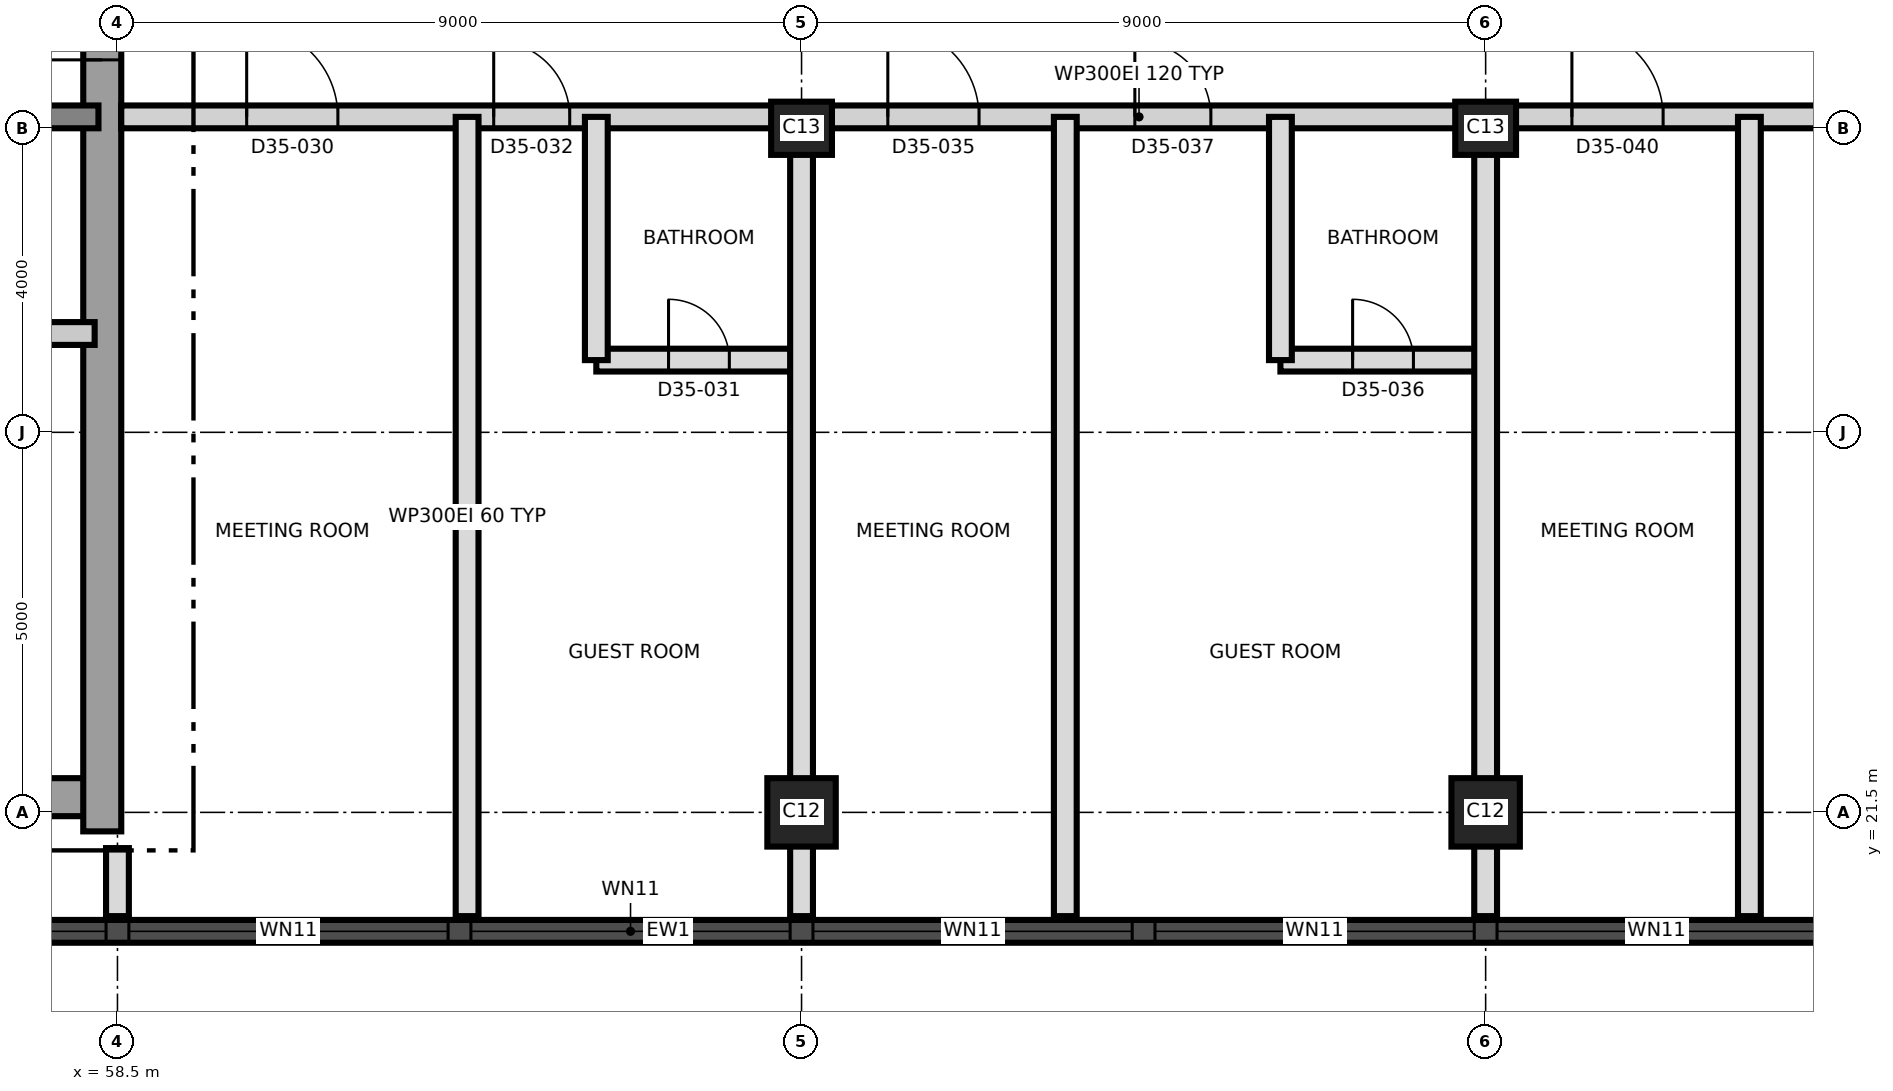
"""IFC4 building model, lengths in metres.
Left out: names, types, materials, properties, quantities, classifications, styles, units other than length and angle.
Written with IfcOpenShell. Run it as: python <this file> out.ifc"""

import sys

from ifc_helpers import new_model, si_unit, direction, frame, frame_2d, origin, origin_2d, place, context, subcontext, project, spatial, rectangle, extrude, element, fill, save


model = new_model("IFC4")
c1 = context("Model", 3, precision=1e-05, world=origin(), true_north=direction((0.0, 1.0)))
c2 = subcontext(c1, "Body", "Model", "MODEL_VIEW")
j1 = project(units=[si_unit("LENGTHUNIT", "METRE"), si_unit("PLANEANGLEUNIT", "RADIAN")], contexts=[c1])
p1 = place(None, origin())
s1 = spatial("IfcSite", under=j1, at=p1, CompositionType="ELEMENT")
p2 = place(p1, origin())
s2 = spatial("IfcBuilding", under=s1, at=p2, CompositionType="ELEMENT")
p3 = place(p2, frame((0.0, 0.0, 195.8)))
s3 = spatial("IfcBuildingStorey", under=s2, at=p3, CompositionType="ELEMENT", Elevation=195.8)
p4 = place(p3, frame((31.25, 21.7, 0.0), z_axis=(0.0, 0.0, 1.0), x_axis=(1.0, 0.0, 0.0)))
e1 = element("IfcWall", 1, at=p4, inside=s3, PredefinedType="SHEAR", context=c2, shape_type="SweptSolid", body=[
    extrude(rectangle(XDim=27.0, YDim=0.5, at=frame_2d((13.5, 0.0))), origin(), (0.0, 0.0, 1.0), 3.7),
])
p5 = place(p3, frame((58.3, 21.25, 0.0), z_axis=(0.0, 0.0, 1.0), x_axis=(0.0, 1.0, 0.0)))
e2 = element("IfcWall", 2, at=p5, inside=s3, PredefinedType="SHEAR", context=c2, shape_type="SweptSolid", body=[
    extrude(rectangle(XDim=18.5, YDim=0.5, at=frame_2d((9.25, 0.0))), origin(), (0.0, 0.0, 1.0), 3.7),
])
p6 = place(p5, frame((10.15, 0.0, 0.0)))
e3 = element("IfcOpeningElement", 3, at=p6, cuts=e2, PredefinedType="OPENING", context=c2, shape_type="SweptSolid", body=[
    extrude(rectangle(XDim=1.2, YDim=2.1, at=frame_2d((0.6, 1.05))), frame((0.0, 0.26, 0.0), z_axis=(0.0, -1.0, 0.0), x_axis=(1.0, 0.0, 0.0)), (0.0, 0.0, 1.0), 0.52),
])
p7 = place(p3, frame((31.75, 30.65, 0.0), z_axis=(0.0, 0.0, 1.0), x_axis=(1.0, 0.0, 0.0)))
e4 = element("IfcWall", 4, at=p7, inside=s3, PredefinedType="SHEAR", context=c2, shape_type="SweptSolid", body=[
    extrude(rectangle(XDim=26.5, YDim=0.3, at=frame_2d((13.25, 0.0))), origin(), (0.0, 0.0, 1.0), 3.7),
])
p8 = place(p7, frame((24.75, 0.0, 0.0)))
e5 = element("IfcOpeningElement", 5, at=p8, cuts=e4, PredefinedType="OPENING", context=c2, shape_type="SweptSolid", body=[
    extrude(rectangle(XDim=1.0, YDim=2.1, at=frame_2d((0.5, 1.05))), frame((0.0, 0.16, 0.0), z_axis=(0.0, -1.0, 0.0), x_axis=(1.0, 0.0, 0.0)), (0.0, 0.0, 1.0), 0.32),
])
p9 = place(p7, frame((4.05, 0.0, 0.0)))
e6 = element("IfcOpeningElement", 6, at=p9, cuts=e4, PredefinedType="OPENING", context=c2, shape_type="SweptSolid", body=[
    extrude(rectangle(XDim=1.0, YDim=2.1, at=frame_2d((0.5, 1.05))), frame((0.0, 0.16, 0.0), z_axis=(0.0, -1.0, 0.0), x_axis=(1.0, 0.0, 0.0)), (0.0, 0.0, 1.0), 0.32),
])
for number, where, z_axis, x_axis in (
    (7, (67.5, 21.5, 0.0), (0.0, 0.0, 1.0), (1.0, 0.0, 0.0)),
    (8, (76.5, 21.5, 0.0), (0.0, 0.0, 1.0), (1.0, 0.0, 0.0)),
):
    element("IfcColumn", number, at=place(p3, frame(where, z_axis=z_axis, x_axis=x_axis)), inside=s3, PredefinedType="COLUMN", context=c2, shape_type="SweptSolid", body=[
        extrude(rectangle(XDim=0.9, YDim=0.9, at=origin_2d()), origin(), (0.0, 0.0, 1.0), 3.7),
    ])
for number, where, z_axis, x_axis in (
    (9, (67.5, 30.5, 0.0), (0.0, 0.0, 1.0), (1.0, 0.0, 0.0)),
    (10, (76.5, 30.5, 0.0), (0.0, 0.0, 1.0), (1.0, 0.0, 0.0)),
):
    element("IfcColumn", number, at=place(p3, frame(where, z_axis=z_axis, x_axis=x_axis)), inside=s3, PredefinedType="COLUMN", context=c2, shape_type="SweptSolid", body=[
        extrude(rectangle(XDim=0.8, YDim=0.7, at=origin_2d()), origin(), (0.0, 0.0, 1.0), 3.7),
    ])
p10 = place(p3, frame((44.01, 19.935, 0.0), z_axis=(0.0, 0.0, 1.0), x_axis=(1.0, 0.0, 0.0)))
e11 = element("IfcWall", 11, at=p10, inside=s3, PredefinedType="SOLIDWALL", context=c2, shape_type="SweptSolid", body=[
    extrude(rectangle(XDim=43.477, YDim=0.3, at=frame_2d((21.738, 0.0))), origin(), (0.0, 0.0, 1.0), 3.4),
])
p11 = place(p10, frame((1.845, 0.0, 0.3)))
e12 = element("IfcOpeningElement", 12, at=p11, cuts=e11, PredefinedType="OPENING", context=c2, shape_type="SweptSolid", body=[
    extrude(rectangle(XDim=1.8, YDim=2.4, at=frame_2d((0.9, 1.2))), frame((0.0, 0.16, 0.0), z_axis=(0.0, -1.0, 0.0), x_axis=(1.0, 0.0, 0.0)), (0.0, 0.0, 1.0), 0.32),
])
p12 = place(p10, frame((5.64, 0.0, 0.9)))
e13 = element("IfcOpeningElement", 13, at=p12, cuts=e11, PredefinedType="OPENING", context=c2, shape_type="SweptSolid", body=[
    extrude(rectangle(XDim=4.2, YDim=1.5, at=frame_2d((2.1, 0.75))), frame((0.0, 0.16, 0.0), z_axis=(0.0, -1.0, 0.0), x_axis=(1.0, 0.0, 0.0)), (0.0, 0.0, 1.0), 0.32),
])
p13 = place(p10, frame((10.14, 0.0, 0.9)))
e14 = element("IfcOpeningElement", 14, at=p13, cuts=e11, PredefinedType="OPENING", context=c2, shape_type="SweptSolid", body=[
    extrude(rectangle(XDim=4.2, YDim=1.5, at=frame_2d((2.1, 0.75))), frame((0.0, 0.16, 0.0), z_axis=(0.0, -1.0, 0.0), x_axis=(1.0, 0.0, 0.0)), (0.0, 0.0, 1.0), 0.32),
])
p14 = place(p10, frame((14.64, 0.0, 0.9)))
e15 = element("IfcOpeningElement", 15, at=p14, cuts=e11, PredefinedType="OPENING", context=c2, shape_type="SweptSolid", body=[
    extrude(rectangle(XDim=4.2, YDim=1.5, at=frame_2d((2.1, 0.75))), frame((0.0, 0.16, 0.0), z_axis=(0.0, -1.0, 0.0), x_axis=(1.0, 0.0, 0.0)), (0.0, 0.0, 1.0), 0.32),
])
p15 = place(p10, frame((19.14, 0.0, 0.9)))
e16 = element("IfcOpeningElement", 16, at=p15, cuts=e11, PredefinedType="OPENING", context=c2, shape_type="SweptSolid", body=[
    extrude(rectangle(XDim=4.2, YDim=1.5, at=frame_2d((2.1, 0.75))), frame((0.0, 0.16, 0.0), z_axis=(0.0, -1.0, 0.0), x_axis=(1.0, 0.0, 0.0)), (0.0, 0.0, 1.0), 0.32),
])
p16 = place(p10, frame((23.64, 0.0, 0.9)))
e17 = element("IfcOpeningElement", 17, at=p16, cuts=e11, PredefinedType="OPENING", context=c2, shape_type="SweptSolid", body=[
    extrude(rectangle(XDim=4.2, YDim=1.5, at=frame_2d((2.1, 0.75))), frame((0.0, 0.16, 0.0), z_axis=(0.0, -1.0, 0.0), x_axis=(1.0, 0.0, 0.0)), (0.0, 0.0, 1.0), 0.32),
])
p17 = place(p10, frame((28.14, 0.0, 0.9)))
e18 = element("IfcOpeningElement", 18, at=p17, cuts=e11, PredefinedType="OPENING", context=c2, shape_type="SweptSolid", body=[
    extrude(rectangle(XDim=4.2, YDim=1.5, at=frame_2d((2.1, 0.75))), frame((0.0, 0.16, 0.0), z_axis=(0.0, -1.0, 0.0), x_axis=(1.0, 0.0, 0.0)), (0.0, 0.0, 1.0), 0.32),
])
p18 = place(p10, frame((32.64, 0.0, 0.9)))
e19 = element("IfcOpeningElement", 19, at=p18, cuts=e11, PredefinedType="OPENING", context=c2, shape_type="SweptSolid", body=[
    extrude(rectangle(XDim=4.2, YDim=1.5, at=frame_2d((2.1, 0.75))), frame((0.0, 0.16, 0.0), z_axis=(0.0, -1.0, 0.0), x_axis=(1.0, 0.0, 0.0)), (0.0, 0.0, 1.0), 0.32),
])
p19 = place(p10, frame((37.14, 0.0, 0.9)))
e20 = element("IfcOpeningElement", 20, at=p19, cuts=e11, PredefinedType="OPENING", context=c2, shape_type="SweptSolid", body=[
    extrude(rectangle(XDim=4.2, YDim=1.5, at=frame_2d((2.1, 0.75))), frame((0.0, 0.16, 0.0), z_axis=(0.0, -1.0, 0.0), x_axis=(1.0, 0.0, 0.0)), (0.0, 0.0, 1.0), 0.32),
])
p20 = place(p3, frame((55.8, 27.8, 0.0), z_axis=(0.0, 0.0, 1.0), x_axis=(1.0, 0.0, 0.0)))
e21 = element("IfcWall", 21, at=p20, inside=s3, PredefinedType="PARTITIONING", context=c2, shape_type="SweptSolid", body=[
    extrude(rectangle(XDim=2.4, YDim=0.3, at=frame_2d((1.2, 0.0))), origin(), (0.0, 0.0, 1.0), 3.4),
])
p21 = place(p20, frame((0.75, 0.0, 0.0)))
e22 = element("IfcOpeningElement", 22, at=p21, cuts=e21, PredefinedType="OPENING", context=c2, shape_type="SweptSolid", body=[
    extrude(rectangle(XDim=0.9, YDim=2.1, at=frame_2d((0.45, 1.05))), frame((0.0, 0.16, 0.0), z_axis=(0.0, -1.0, 0.0), x_axis=(1.0, 0.0, 0.0)), (0.0, 0.0, 1.0), 0.32),
])
p22 = place(p3, frame((64.8, 27.45, 0.0), z_axis=(0.0, 0.0, 1.0), x_axis=(1.0, 0.0, 0.0)))
e23 = element("IfcWall", 23, at=p22, inside=s3, PredefinedType="PARTITIONING", context=c2, shape_type="SweptSolid", body=[
    extrude(rectangle(XDim=2.7, YDim=0.3, at=frame_2d((1.35, 0.0))), origin(), (0.0, 0.0, 1.0), 3.4),
])
p23 = place(p22, frame((0.95, 0.0, 0.0)))
e24 = element("IfcOpeningElement", 24, at=p23, cuts=e23, PredefinedType="OPENING", context=c2, shape_type="SweptSolid", body=[
    extrude(rectangle(XDim=0.8, YDim=2.1, at=frame_2d((0.4, 1.05))), frame((0.0, 0.16, 0.0), z_axis=(0.0, -1.0, 0.0), x_axis=(1.0, 0.0, 0.0)), (0.0, 0.0, 1.0), 0.32),
])
p24 = place(p3, frame((73.8, 27.45, 0.0), z_axis=(0.0, 0.0, 1.0), x_axis=(1.0, 0.0, 0.0)))
e25 = element("IfcWall", 25, at=p24, inside=s3, PredefinedType="PARTITIONING", context=c2, shape_type="SweptSolid", body=[
    extrude(rectangle(XDim=2.7, YDim=0.3, at=frame_2d((1.35, 0.0))), origin(), (0.0, 0.0, 1.0), 3.4),
])
p25 = place(p24, frame((0.95, 0.0, 0.0)))
e26 = element("IfcOpeningElement", 26, at=p25, cuts=e25, PredefinedType="OPENING", context=c2, shape_type="SweptSolid", body=[
    extrude(rectangle(XDim=0.8, YDim=2.1, at=frame_2d((0.4, 1.05))), frame((0.0, 0.16, 0.0), z_axis=(0.0, -1.0, 0.0), x_axis=(1.0, 0.0, 0.0)), (0.0, 0.0, 1.0), 0.32),
])
p26 = place(p3, frame((58.55, 30.65, 0.0), z_axis=(0.0, 0.0, 1.0), x_axis=(1.0, 0.0, 0.0)))
e27 = element("IfcWall", 27, at=p26, inside=s3, PredefinedType="PARTITIONING", context=c2, shape_type="SweptSolid", body=[
    extrude(rectangle(XDim=26.78, YDim=0.3, at=frame_2d((13.39, 0.0))), origin(), (0.0, 0.0, 1.0), 3.4),
])
p27 = place(p26, frame((1.65, 0.0, 0.0)))
e28 = element("IfcOpeningElement", 28, at=p27, cuts=e27, PredefinedType="OPENING", context=c2, shape_type="SweptSolid", body=[
    extrude(rectangle(XDim=1.2, YDim=2.1, at=frame_2d((0.6, 1.05))), frame((0.0, 0.16, 0.0), z_axis=(0.0, -1.0, 0.0), x_axis=(1.0, 0.0, 0.0)), (0.0, 0.0, 1.0), 0.32),
])
p28 = place(p26, frame((4.9, 0.0, 0.0)))
e29 = element("IfcOpeningElement", 29, at=p28, cuts=e27, PredefinedType="OPENING", context=c2, shape_type="SweptSolid", body=[
    extrude(rectangle(XDim=1.0, YDim=2.1, at=frame_2d((0.5, 1.05))), frame((0.0, 0.16, 0.0), z_axis=(0.0, -1.0, 0.0), x_axis=(1.0, 0.0, 0.0)), (0.0, 0.0, 1.0), 0.32),
])
p29 = place(p26, frame((10.085, 0.0, 0.0)))
e30 = element("IfcOpeningElement", 30, at=p29, cuts=e27, PredefinedType="OPENING", context=c2, shape_type="SweptSolid", body=[
    extrude(rectangle(XDim=1.2, YDim=2.1, at=frame_2d((0.6, 1.05))), frame((0.0, 0.16, 0.0), z_axis=(0.0, -1.0, 0.0), x_axis=(1.0, 0.0, 0.0)), (0.0, 0.0, 1.0), 0.32),
])
p30 = place(p26, frame((13.335, 0.0, 0.0)))
e31 = element("IfcOpeningElement", 31, at=p30, cuts=e27, PredefinedType="OPENING", context=c2, shape_type="SweptSolid", body=[
    extrude(rectangle(XDim=1.0, YDim=2.1, at=frame_2d((0.5, 1.05))), frame((0.0, 0.16, 0.0), z_axis=(0.0, -1.0, 0.0), x_axis=(1.0, 0.0, 0.0)), (0.0, 0.0, 1.0), 0.32),
])
p31 = place(p26, frame((19.085, 0.0, 0.0)))
e32 = element("IfcOpeningElement", 32, at=p31, cuts=e27, PredefinedType="OPENING", context=c2, shape_type="SweptSolid", body=[
    extrude(rectangle(XDim=1.2, YDim=2.1, at=frame_2d((0.6, 1.05))), frame((0.0, 0.16, 0.0), z_axis=(0.0, -1.0, 0.0), x_axis=(1.0, 0.0, 0.0)), (0.0, 0.0, 1.0), 0.32),
])
p32 = place(p26, frame((22.335, 0.0, 0.0)))
e33 = element("IfcOpeningElement", 33, at=p32, cuts=e27, PredefinedType="OPENING", context=c2, shape_type="SweptSolid", body=[
    extrude(rectangle(XDim=1.0, YDim=2.1, at=frame_2d((0.5, 1.05))), frame((0.0, 0.16, 0.0), z_axis=(0.0, -1.0, 0.0), x_axis=(1.0, 0.0, 0.0)), (0.0, 0.0, 1.0), 0.32),
])
p33 = place(p3, frame((58.5, 20.135, 0.0), z_axis=(0.0, 0.0, 1.0), x_axis=(0.0, 1.0, 0.0)))
e34 = element("IfcWall", 34, at=p33, inside=s3, PredefinedType="PARTITIONING", context=c2, shape_type="SweptSolid", body=[
    extrude(rectangle(XDim=0.895, YDim=0.3, at=frame_2d((0.448, 0.0))), origin(), (0.0, 0.0, 1.0), 3.4),
])
p34 = place(p3, frame((63.1, 20.135, 0.0), z_axis=(0.0, 0.0, 1.0), x_axis=(0.0, 1.0, 0.0)))
e35 = element("IfcWall", 35, at=p34, inside=s3, PredefinedType="PARTITIONING", context=c2, shape_type="SweptSolid", body=[
    extrude(rectangle(XDim=10.515, YDim=0.3, at=frame_2d((5.257, 0.0))), origin(), (0.0, 0.0, 1.0), 3.4),
])
p35 = place(p3, frame((64.8, 27.45, 0.0), z_axis=(0.0, 0.0, 1.0), x_axis=(0.0, 1.0, 0.0)))
e36 = element("IfcWall", 36, at=p35, inside=s3, PredefinedType="PARTITIONING", context=c2, shape_type="SweptSolid", body=[
    extrude(rectangle(XDim=3.2, YDim=0.3, at=frame_2d((1.6, 0.0))), origin(), (0.0, 0.0, 1.0), 3.4),
])
for number, where, z_axis, x_axis in (
    (37, (67.5, 20.135, 0.0), (0.0, 0.0, 1.0), (0.0, 1.0, 0.0)),
    (38, (70.97, 20.135, 0.0), (0.0, 0.0, 1.0), (0.0, 1.0, 0.0)),
):
    element("IfcWall", number, at=place(p3, frame(where, z_axis=z_axis, x_axis=x_axis)), inside=s3, PredefinedType="PARTITIONING", context=c2, shape_type="SweptSolid", body=[
        extrude(rectangle(XDim=10.515, YDim=0.3, at=frame_2d((5.257, 0.0))), origin(), (0.0, 0.0, 1.0), 3.4),
    ])
p36 = place(p3, frame((73.8, 27.45, 0.0), z_axis=(0.0, 0.0, 1.0), x_axis=(0.0, 1.0, 0.0)))
e39 = element("IfcWall", 39, at=p36, inside=s3, PredefinedType="PARTITIONING", context=c2, shape_type="SweptSolid", body=[
    extrude(rectangle(XDim=3.2, YDim=0.3, at=frame_2d((1.6, 0.0))), origin(), (0.0, 0.0, 1.0), 3.4),
])
for number, where, z_axis, x_axis in (
    (40, (76.5, 20.135, 0.0), (0.0, 0.0, 1.0), (0.0, 1.0, 0.0)),
    (41, (79.97, 20.135, 0.0), (0.0, 0.0, 1.0), (0.0, 1.0, 0.0)),
):
    element("IfcWall", number, at=place(p3, frame(where, z_axis=z_axis, x_axis=x_axis)), inside=s3, PredefinedType="PARTITIONING", context=c2, shape_type="SweptSolid", body=[
        extrude(rectangle(XDim=10.515, YDim=0.3, at=frame_2d((5.257, 0.0))), origin(), (0.0, 0.0, 1.0), 3.4),
    ])
p37 = place(p13, origin())
e42 = element("IfcWindow", 42, at=p37, inside=s3, PartitioningType="SINGLE_PANEL", PredefinedType="WINDOW", context=c2, shape_type="SweptSolid", body=[
    extrude(rectangle(XDim=4.2, YDim=1.5, at=frame_2d((2.1, 0.75))), frame((0.0, 0.03, 0.0), z_axis=(0.0, -1.0, 0.0), x_axis=(1.0, 0.0, 0.0)), (0.0, 0.0, 1.0), 0.06),
])
fill(e14, e42)
p38 = place(p14, origin())
e43 = element("IfcWindow", 43, at=p38, inside=s3, PartitioningType="SINGLE_PANEL", PredefinedType="WINDOW", context=c2, shape_type="SweptSolid", body=[
    extrude(rectangle(XDim=4.2, YDim=1.5, at=frame_2d((2.1, 0.75))), frame((0.0, 0.03, 0.0), z_axis=(0.0, -1.0, 0.0), x_axis=(1.0, 0.0, 0.0)), (0.0, 0.0, 1.0), 0.06),
])
fill(e15, e43)
p39 = place(p15, origin())
e44 = element("IfcWindow", 44, at=p39, inside=s3, PartitioningType="SINGLE_PANEL", PredefinedType="WINDOW", context=c2, shape_type="SweptSolid", body=[
    extrude(rectangle(XDim=4.2, YDim=1.5, at=frame_2d((2.1, 0.75))), frame((0.0, 0.03, 0.0), z_axis=(0.0, -1.0, 0.0), x_axis=(1.0, 0.0, 0.0)), (0.0, 0.0, 1.0), 0.06),
])
fill(e16, e44)
p40 = place(p16, origin())
e45 = element("IfcWindow", 45, at=p40, inside=s3, PartitioningType="SINGLE_PANEL", PredefinedType="WINDOW", context=c2, shape_type="SweptSolid", body=[
    extrude(rectangle(XDim=4.2, YDim=1.5, at=frame_2d((2.1, 0.75))), frame((0.0, 0.03, 0.0), z_axis=(0.0, -1.0, 0.0), x_axis=(1.0, 0.0, 0.0)), (0.0, 0.0, 1.0), 0.06),
])
fill(e17, e45)
p41 = place(p17, origin())
e46 = element("IfcWindow", 46, at=p41, inside=s3, PartitioningType="SINGLE_PANEL", PredefinedType="WINDOW", context=c2, shape_type="SweptSolid", body=[
    extrude(rectangle(XDim=4.2, YDim=1.5, at=frame_2d((2.1, 0.75))), frame((0.0, 0.03, 0.0), z_axis=(0.0, -1.0, 0.0), x_axis=(1.0, 0.0, 0.0)), (0.0, 0.0, 1.0), 0.06),
])
fill(e18, e46)
p42 = place(p18, origin())
e47 = element("IfcWindow", 47, at=p42, inside=s3, PartitioningType="SINGLE_PANEL", PredefinedType="WINDOW", context=c2, shape_type="SweptSolid", body=[
    extrude(rectangle(XDim=4.2, YDim=1.5, at=frame_2d((2.1, 0.75))), frame((0.0, 0.03, 0.0), z_axis=(0.0, -1.0, 0.0), x_axis=(1.0, 0.0, 0.0)), (0.0, 0.0, 1.0), 0.06),
])
fill(e19, e47)
p43 = place(p6, origin())
e48 = element("IfcDoor", 48, at=p43, inside=s3, OperationType="SINGLE_SWING_LEFT", PredefinedType="DOOR", context=c2, shape_type="SweptSolid", body=[
    extrude(rectangle(XDim=1.2, YDim=2.1, at=frame_2d((0.6, 1.05))), frame((0.0, 0.025, 0.0), z_axis=(0.0, -1.0, 0.0), x_axis=(1.0, 0.0, 0.0)), (0.0, 0.0, 1.0), 0.05),
])
fill(e3, e48)
p44 = place(p27, origin())
e49 = element("IfcDoor", 49, at=p44, inside=s3, OperationType="SINGLE_SWING_LEFT", PredefinedType="DOOR", context=c2, shape_type="SweptSolid", body=[
    extrude(rectangle(XDim=1.2, YDim=2.1, at=frame_2d((0.6, 1.05))), frame((0.0, 0.025, 0.0), z_axis=(0.0, -1.0, 0.0), x_axis=(1.0, 0.0, 0.0)), (0.0, 0.0, 1.0), 0.05),
])
fill(e28, e49)
p45 = place(p23, origin())
e50 = element("IfcDoor", 50, at=p45, inside=s3, OperationType="SINGLE_SWING_RIGHT", PredefinedType="DOOR", context=c2, shape_type="SweptSolid", body=[
    extrude(rectangle(XDim=0.8, YDim=2.1, at=frame_2d((0.4, 1.05))), frame((0.0, 0.025, 0.0), z_axis=(0.0, -1.0, 0.0), x_axis=(1.0, 0.0, 0.0)), (0.0, 0.0, 1.0), 0.05),
])
fill(e24, e50)
p46 = place(p28, origin())
e51 = element("IfcDoor", 51, at=p46, inside=s3, OperationType="SINGLE_SWING_LEFT", PredefinedType="DOOR", context=c2, shape_type="SweptSolid", body=[
    extrude(rectangle(XDim=1.0, YDim=2.1, at=frame_2d((0.5, 1.05))), frame((0.0, 0.025, 0.0), z_axis=(0.0, -1.0, 0.0), x_axis=(1.0, 0.0, 0.0)), (0.0, 0.0, 1.0), 0.05),
])
fill(e29, e51)
p47 = place(p29, origin())
e52 = element("IfcDoor", 52, at=p47, inside=s3, OperationType="SINGLE_SWING_RIGHT", PredefinedType="DOOR", context=c2, shape_type="SweptSolid", body=[
    extrude(rectangle(XDim=1.2, YDim=2.1, at=frame_2d((0.6, 1.05))), frame((0.0, 0.025, 0.0), z_axis=(0.0, -1.0, 0.0), x_axis=(1.0, 0.0, 0.0)), (0.0, 0.0, 1.0), 0.05),
])
fill(e30, e52)
p48 = place(p25, origin())
e53 = element("IfcDoor", 53, at=p48, inside=s3, OperationType="SINGLE_SWING_LEFT", PredefinedType="DOOR", context=c2, shape_type="SweptSolid", body=[
    extrude(rectangle(XDim=0.8, YDim=2.1, at=frame_2d((0.4, 1.05))), frame((0.0, 0.025, 0.0), z_axis=(0.0, -1.0, 0.0), x_axis=(1.0, 0.0, 0.0)), (0.0, 0.0, 1.0), 0.05),
])
fill(e26, e53)
p49 = place(p30, origin())
e54 = element("IfcDoor", 54, at=p49, inside=s3, OperationType="SINGLE_SWING_LEFT", PredefinedType="DOOR", context=c2, shape_type="SweptSolid", body=[
    extrude(rectangle(XDim=1.0, YDim=2.1, at=frame_2d((0.5, 1.05))), frame((0.0, 0.025, 0.0), z_axis=(0.0, -1.0, 0.0), x_axis=(1.0, 0.0, 0.0)), (0.0, 0.0, 1.0), 0.05),
])
fill(e31, e54)
p50 = place(p31, origin())
e55 = element("IfcDoor", 55, at=p50, inside=s3, OperationType="SINGLE_SWING_LEFT", PredefinedType="DOOR", context=c2, shape_type="SweptSolid", body=[
    extrude(rectangle(XDim=1.2, YDim=2.1, at=frame_2d((0.6, 1.05))), frame((0.0, 0.025, 0.0), z_axis=(0.0, -1.0, 0.0), x_axis=(1.0, 0.0, 0.0)), (0.0, 0.0, 1.0), 0.05),
])
fill(e32, e55)
save(model, sys.argv[1])
